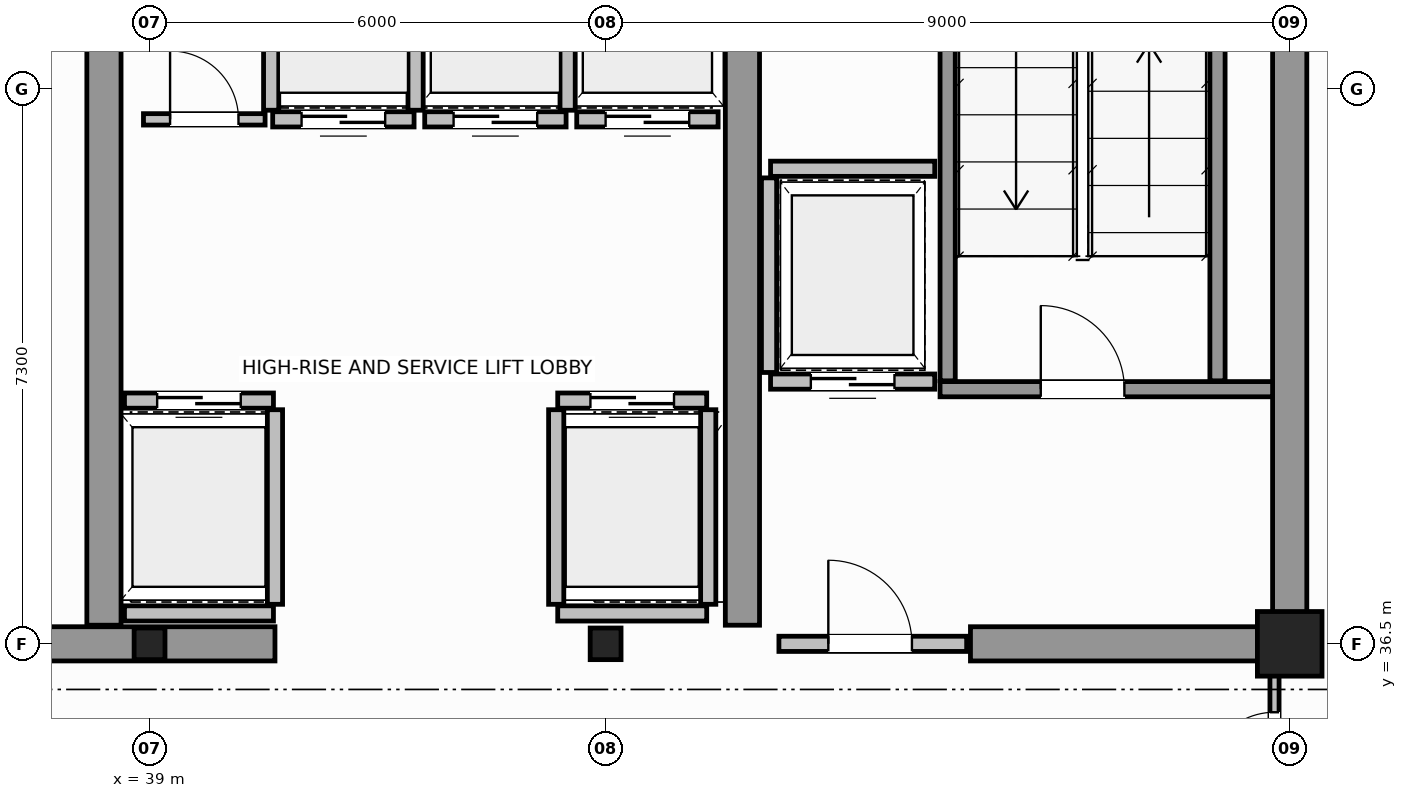
"""IFC4 building model, lengths in metres.
Left out: names, types, materials, properties, quantities, classifications, styles, units other than length and angle.
Written with IfcOpenShell. Run it as: python <this file> out.ifc"""

import sys

from ifc_helpers import new_model, si_unit, direction, frame, frame_2d, origin, origin_2d, place, context, subcontext, project, spatial, rectangle, i_section, extrude, source, transform, mapped, element, fill, save


model = new_model("IFC4")
c1 = context("Model", 3, precision=1e-05, world=origin(), true_north=direction((0.0, 1.0)))
c2 = subcontext(c1, "Body", "Model", "MODEL_VIEW")
j1 = project(units=[si_unit("LENGTHUNIT", "METRE"), si_unit("PLANEANGLEUNIT", "RADIAN")], contexts=[c1])
p1 = place(None, origin())
s1 = spatial("IfcSite", under=j1, at=p1, CompositionType="ELEMENT")
p2 = place(p1, origin())
s2 = spatial("IfcBuilding", under=s1, at=p2, CompositionType="ELEMENT")
p3 = place(p2, frame((0.0, 0.0, 295.4)))
s3 = spatial("IfcBuildingStorey", under=s2, at=p3, CompositionType="ELEMENT", Elevation=295.4)
m1 = source(origin(), c2, "Body", "SweptSolid", [
    extrude(i_section(OverallWidth=0.406, OverallDepth=0.416, WebThickness=0.03, FlangeThickness=0.042, FilletRadius=0.015, at=origin_2d()), origin(), (0.0, 0.0, 1.0), 3.8),
])
for number, where, z_axis, x_axis in (
    (1, (39.0, 36.5, 0.0), (0.0, 0.0, 1.0), (1.0, 0.0, 0.0)),
    (2, (45.0, 36.5, 0.0), (0.0, 0.0, 1.0), (1.0, 0.0, 0.0)),
):
    element("IfcColumn", number, at=place(p3, frame(where, z_axis=z_axis, x_axis=x_axis)), inside=s3, PredefinedType="COLUMN", context=c2, shape_type="MappedRepresentation", body=[
        mapped(m1, transform((0.0, 0.0, 0.0), scale=1.0)),
    ])
m2 = source(origin(), c2, "Body", "SweptSolid", [
    extrude(rectangle(XDim=0.85, YDim=0.85, at=origin_2d()), origin(), (0.0, 0.0, 1.0), 3.8),
])
p4 = place(p3, frame((54.0, 36.5, 0.0), z_axis=(0.0, 0.0, 1.0), x_axis=(1.0, 0.0, 0.0)))
e3 = element("IfcColumn", 3, at=p4, inside=s3, PredefinedType="COLUMN", context=c2, shape_type="MappedRepresentation", body=[
    mapped(m2, transform((0.0, 0.0, 0.0), scale=1.0)),
])
p5 = place(p3, frame((54.0, 36.5, 0.0), z_axis=(0.0, 0.0, 1.0), x_axis=(0.0, 1.0, 0.0)))
e4 = element("IfcWall", 4, at=p5, inside=s3, PredefinedType="SHEAR", context=c2, shape_type="SweptSolid", body=[
    extrude(rectangle(XDim=14.5, YDim=0.45, at=frame_2d((7.25, 0.0))), origin(), (0.0, 0.0, 1.0), 3.8),
])
p6 = place(p3, frame((36.15, 36.5, 0.0), z_axis=(0.0, 0.0, 1.0), x_axis=(1.0, 0.0, 0.0)))
e5 = element("IfcWall", 5, at=p6, inside=s3, PredefinedType="SHEAR", context=c2, shape_type="SweptSolid", body=[
    extrude(rectangle(XDim=4.5, YDim=0.45, at=frame_2d((2.25, 0.0))), origin(), (0.0, 0.0, 1.0), 3.8),
])
p7 = place(p3, frame((49.8, 36.5, 0.0), z_axis=(0.0, 0.0, 1.0), x_axis=(1.0, 0.0, 0.0)))
e6 = element("IfcWall", 6, at=p7, inside=s3, PredefinedType="SHEAR", context=c2, shape_type="SweptSolid", body=[
    extrude(rectangle(XDim=3.955, YDim=0.45, at=frame_2d((1.978, 0.0))), origin(), (0.0, 0.0, 1.0), 2.58),
])
for number, where, z_axis, x_axis in (
    (7, (38.4, 36.745, 0.0), (0.0, 0.0, 1.0), (0.0, 1.0, 0.0)),
    (8, (46.8, 36.745, 0.0), (0.0, 0.0, 1.0), (0.0, 1.0, 0.0)),
):
    element("IfcWall", number, at=place(p3, frame(where, z_axis=z_axis, x_axis=x_axis)), inside=s3, PredefinedType="SHEAR", context=c2, shape_type="SweptSolid", body=[
        extrude(rectangle(XDim=9.455, YDim=0.45, at=frame_2d((4.728, 0.0))), origin(), (0.0, 0.0, 1.0), 3.8),
    ])
p8 = place(p3, frame((49.4, 39.85, 0.0), z_axis=(0.0, 0.0, 1.0), x_axis=(1.0, 0.0, 0.0)))
e9 = element("IfcWall", 9, at=p8, inside=s3, PredefinedType="SOLIDWALL", context=c2, shape_type="SweptSolid", body=[
    extrude(rectangle(XDim=4.375, YDim=0.2, at=frame_2d((2.188, 0.0))), origin(), (0.0, 0.0, 1.0), 3.8),
])
p9 = place(p8, frame((1.325, 0.0, 0.0)))
e10 = element("IfcOpeningElement", 10, at=p9, cuts=e9, PredefinedType="OPENING", context=c2, shape_type="SweptSolid", body=[
    extrude(rectangle(XDim=1.1, YDim=2.15, at=frame_2d((0.55, 1.075))), frame((0.0, 0.11, 0.0), z_axis=(0.0, -1.0, 0.0), x_axis=(1.0, 0.0, 0.0)), (0.0, 0.0, 1.0), 0.22),
])
for number, where, z_axis, x_axis in (
    (11, (49.5, 39.96, 0.0), (0.0, 0.0, 1.0), (0.0, 1.0, 0.0)),
    (12, (53.05, 39.96, 0.0), (0.0, 0.0, 1.0), (0.0, 1.0, 0.0)),
):
    element("IfcWall", number, at=place(p3, frame(where, z_axis=z_axis, x_axis=x_axis)), inside=s3, PredefinedType="SOLIDWALL", context=c2, shape_type="SweptSolid", body=[
        extrude(rectangle(XDim=9.93, YDim=0.2, at=frame_2d((4.965, 0.0))), origin(), (0.0, 0.0, 1.0), 3.8),
    ])
p10 = place(p3, frame((47.28, 36.5, 0.0), z_axis=(0.0, 0.0, 1.0), x_axis=(1.0, 0.0, 0.0)))
e13 = element("IfcWall", 13, at=p10, inside=s3, PredefinedType="SOLIDWALL", context=c2, shape_type="SweptSolid", body=[
    extrude(rectangle(XDim=2.47, YDim=0.2, at=frame_2d((1.235, 0.0))), origin(), (0.0, 0.0, 1.0), 2.57),
])
p11 = place(p10, frame((0.65, 0.0, 0.0)))
e14 = element("IfcOpeningElement", 14, at=p11, cuts=e13, PredefinedType="OPENING", context=c2, shape_type="SweptSolid", body=[
    extrude(rectangle(XDim=1.1, YDim=2.15, at=frame_2d((0.55, 1.075))), frame((0.0, 0.11, 0.0), z_axis=(0.0, -1.0, 0.0), x_axis=(1.0, 0.0, 0.0)), (0.0, 0.0, 1.0), 0.22),
])
p12 = place(p3, frame((38.67, 39.7, 0.0), z_axis=(0.0, 0.0, 1.0), x_axis=(1.0, 0.0, 0.0)))
e15 = element("IfcWall", 15, at=p12, inside=s3, PredefinedType="SOLIDWALL", context=c2, shape_type="SweptSolid", body=[
    extrude(rectangle(XDim=1.96, YDim=0.2, at=frame_2d((0.98, 0.0))), origin(), (0.0, 0.0, 1.0), 3.58),
])
p13 = place(p12, frame((0.43, 0.0, 0.0)))
e16 = element("IfcOpeningElement", 16, at=p13, cuts=e15, PredefinedType="OPENING", context=c2, shape_type="SweptSolid", body=[
    extrude(rectangle(XDim=1.1, YDim=2.15, at=frame_2d((0.55, 1.075))), frame((0.0, 0.11, 0.0), z_axis=(0.0, -1.0, 0.0), x_axis=(1.0, 0.0, 0.0)), (0.0, 0.0, 1.0), 0.22),
])
p14 = place(p3, frame((38.67, 36.9, 0.0), z_axis=(0.0, 0.0, 1.0), x_axis=(1.0, 0.0, 0.0)))
e17 = element("IfcWall", 17, at=p14, inside=s3, PredefinedType="SOLIDWALL", context=c2, shape_type="SweptSolid", body=[
    extrude(rectangle(XDim=1.96, YDim=0.2, at=frame_2d((0.98, 0.0))), origin(), (0.0, 0.0, 1.0), 3.58),
])
p15 = place(p3, frame((40.65, 37.02, 0.0), z_axis=(0.0, 0.0, 1.0), x_axis=(0.0, 1.0, 0.0)))
e18 = element("IfcWall", 18, at=p15, inside=s3, PredefinedType="SOLIDWALL", context=c2, shape_type="SweptSolid", body=[
    extrude(rectangle(XDim=2.56, YDim=0.2, at=frame_2d((1.28, 0.0))), origin(), (0.0, 0.0, 1.0), 3.58),
])
p16 = place(p3, frame((44.37, 39.7, 0.0), z_axis=(0.0, 0.0, 1.0), x_axis=(1.0, 0.0, 0.0)))
e19 = element("IfcWall", 19, at=p16, inside=s3, PredefinedType="SOLIDWALL", context=c2, shape_type="SweptSolid", body=[
    extrude(rectangle(XDim=1.96, YDim=0.2, at=frame_2d((0.98, 0.0))), origin(), (0.0, 0.0, 1.0), 3.58),
])
p17 = place(p16, frame((0.43, 0.0, 0.0)))
e20 = element("IfcOpeningElement", 20, at=p17, cuts=e19, PredefinedType="OPENING", context=c2, shape_type="SweptSolid", body=[
    extrude(rectangle(XDim=1.1, YDim=2.15, at=frame_2d((0.55, 1.075))), frame((0.0, 0.11, 0.0), z_axis=(0.0, -1.0, 0.0), x_axis=(1.0, 0.0, 0.0)), (0.0, 0.0, 1.0), 0.22),
])
p18 = place(p3, frame((44.37, 36.9, 0.0), z_axis=(0.0, 0.0, 1.0), x_axis=(1.0, 0.0, 0.0)))
e21 = element("IfcWall", 21, at=p18, inside=s3, PredefinedType="SOLIDWALL", context=c2, shape_type="SweptSolid", body=[
    extrude(rectangle(XDim=1.96, YDim=0.2, at=frame_2d((0.98, 0.0))), origin(), (0.0, 0.0, 1.0), 2.57),
])
for number, where, z_axis, x_axis in (
    (22, (44.35, 37.02, 0.0), (0.0, 0.0, 1.0), (0.0, 1.0, 0.0)),
    (23, (46.35, 37.02, 0.0), (0.0, 0.0, 1.0), (0.0, 1.0, 0.0)),
):
    element("IfcWall", number, at=place(p3, frame(where, z_axis=z_axis, x_axis=x_axis)), inside=s3, PredefinedType="SOLIDWALL", context=c2, shape_type="SweptSolid", body=[
        extrude(rectangle(XDim=2.56, YDim=0.2, at=frame_2d((1.28, 0.0))), origin(), (0.0, 0.0, 1.0), 3.58),
    ])
p19 = place(p3, frame((40.62, 43.4, 0.0), z_axis=(0.0, 0.0, 1.0), x_axis=(1.0, 0.0, 0.0)))
e24 = element("IfcWall", 24, at=p19, inside=s3, PredefinedType="SOLIDWALL", context=c2, shape_type="SweptSolid", body=[
    extrude(rectangle(XDim=1.86, YDim=0.2, at=frame_2d((0.93, 0.0))), origin(), (0.0, 0.0, 1.0), 3.58),
])
p20 = place(p19, frame((0.38, 0.0, 0.0)))
e25 = element("IfcOpeningElement", 25, at=p20, cuts=e24, PredefinedType="OPENING", context=c2, shape_type="SweptSolid", body=[
    extrude(rectangle(XDim=1.1, YDim=2.15, at=frame_2d((0.55, 1.075))), frame((0.0, 0.11, 0.0), z_axis=(0.0, -1.0, 0.0), x_axis=(1.0, 0.0, 0.0)), (0.0, 0.0, 1.0), 0.22),
])
for number, where, z_axis, x_axis in (
    (26, (40.6, 43.52, 0.0), (0.0, 0.0, 1.0), (0.0, 1.0, 0.0)),
    (27, (42.5, 43.52, 0.0), (0.0, 0.0, 1.0), (0.0, 1.0, 0.0)),
):
    element("IfcWall", number, at=place(p3, frame(where, z_axis=z_axis, x_axis=x_axis)), inside=s3, PredefinedType="SOLIDWALL", context=c2, shape_type="SweptSolid", body=[
        extrude(rectangle(XDim=2.56, YDim=0.2, at=frame_2d((1.28, 0.0))), origin(), (0.0, 0.0, 1.0), 3.58),
    ])
p21 = place(p3, frame((42.62, 43.4, 0.0), z_axis=(0.0, 0.0, 1.0), x_axis=(1.0, 0.0, 0.0)))
e28 = element("IfcWall", 28, at=p21, inside=s3, PredefinedType="SOLIDWALL", context=c2, shape_type="SweptSolid", body=[
    extrude(rectangle(XDim=1.86, YDim=0.2, at=frame_2d((0.93, 0.0))), origin(), (0.0, 0.0, 1.0), 3.58),
])
p22 = place(p21, frame((0.38, 0.0, 0.0)))
e29 = element("IfcOpeningElement", 29, at=p22, cuts=e28, PredefinedType="OPENING", context=c2, shape_type="SweptSolid", body=[
    extrude(rectangle(XDim=1.1, YDim=2.15, at=frame_2d((0.55, 1.075))), frame((0.0, 0.11, 0.0), z_axis=(0.0, -1.0, 0.0), x_axis=(1.0, 0.0, 0.0)), (0.0, 0.0, 1.0), 0.22),
])
p23 = place(p3, frame((44.5, 43.52, 0.0), z_axis=(0.0, 0.0, 1.0), x_axis=(0.0, 1.0, 0.0)))
e30 = element("IfcWall", 30, at=p23, inside=s3, PredefinedType="SOLIDWALL", context=c2, shape_type="SweptSolid", body=[
    extrude(rectangle(XDim=2.56, YDim=0.2, at=frame_2d((1.28, 0.0))), origin(), (0.0, 0.0, 1.0), 3.58),
])
p24 = place(p3, frame((44.62, 43.4, 0.0), z_axis=(0.0, 0.0, 1.0), x_axis=(1.0, 0.0, 0.0)))
e31 = element("IfcWall", 31, at=p24, inside=s3, PredefinedType="SOLIDWALL", context=c2, shape_type="SweptSolid", body=[
    extrude(rectangle(XDim=1.86, YDim=0.2, at=frame_2d((0.93, 0.0))), origin(), (0.0, 0.0, 1.0), 3.58),
])
p25 = place(p24, frame((0.38, 0.0, 0.0)))
e32 = element("IfcOpeningElement", 32, at=p25, cuts=e31, PredefinedType="OPENING", context=c2, shape_type="SweptSolid", body=[
    extrude(rectangle(XDim=1.1, YDim=2.15, at=frame_2d((0.55, 1.075))), frame((0.0, 0.11, 0.0), z_axis=(0.0, -1.0, 0.0), x_axis=(1.0, 0.0, 0.0)), (0.0, 0.0, 1.0), 0.22),
])
p26 = place(p3, frame((47.17, 39.95, 0.0), z_axis=(0.0, 0.0, 1.0), x_axis=(1.0, 0.0, 0.0)))
e33 = element("IfcWall", 33, at=p26, inside=s3, PredefinedType="SOLIDWALL", context=c2, shape_type="SweptSolid", body=[
    extrude(rectangle(XDim=2.16, YDim=0.2, at=frame_2d((1.08, 0.0))), origin(), (0.0, 0.0, 1.0), 3.58),
])
p27 = place(p26, frame((0.53, 0.0, 0.0)))
e34 = element("IfcOpeningElement", 34, at=p27, cuts=e33, PredefinedType="OPENING", context=c2, shape_type="SweptSolid", body=[
    extrude(rectangle(XDim=1.1, YDim=2.15, at=frame_2d((0.55, 1.075))), frame((0.0, 0.11, 0.0), z_axis=(0.0, -1.0, 0.0), x_axis=(1.0, 0.0, 0.0)), (0.0, 0.0, 1.0), 0.22),
])
p28 = place(p3, frame((47.17, 42.75, 0.0), z_axis=(0.0, 0.0, 1.0), x_axis=(1.0, 0.0, 0.0)))
e35 = element("IfcWall", 35, at=p28, inside=s3, PredefinedType="SOLIDWALL", context=c2, shape_type="SweptSolid", body=[
    extrude(rectangle(XDim=2.16, YDim=0.2, at=frame_2d((1.08, 0.0))), origin(), (0.0, 0.0, 1.0), 3.58),
])
p29 = place(p3, frame((47.15, 40.07, 0.0), z_axis=(0.0, 0.0, 1.0), x_axis=(0.0, 1.0, 0.0)))
e36 = element("IfcWall", 36, at=p29, inside=s3, PredefinedType="SOLIDWALL", context=c2, shape_type="SweptSolid", body=[
    extrude(rectangle(XDim=2.56, YDim=0.2, at=frame_2d((1.28, 0.0))), origin(), (0.0, 0.0, 1.0), 3.58),
])
p30 = place(p3, frame((38.92, 43.4, 0.0), z_axis=(0.0, 0.0, 1.0), x_axis=(1.0, 0.0, 0.0)))
e37 = element("IfcWall", 37, at=p30, inside=s3, PredefinedType="PARTITIONING", context=c2, shape_type="SweptSolid", body=[
    extrude(rectangle(XDim=1.6, YDim=0.15, at=frame_2d((0.8, 0.0))), origin(), (0.0, 0.0, 1.0), 3.58),
])
p31 = place(p30, frame((0.35, 0.0, 0.0)))
e38 = element("IfcOpeningElement", 38, at=p31, cuts=e37, PredefinedType="OPENING", context=c2, shape_type="SweptSolid", body=[
    extrude(rectangle(XDim=0.9, YDim=2.1, at=frame_2d((0.45, 1.05))), frame((0.0, 0.085, 0.0), z_axis=(0.0, -1.0, 0.0), x_axis=(1.0, 0.0, 0.0)), (0.0, 0.0, 1.0), 0.17),
])
p32 = place(p3, frame((53.8, 34.0, 0.0), z_axis=(0.0, 0.0, 1.0), x_axis=(0.0, 1.0, 0.0)))
e39 = element("IfcWall", 39, at=p32, inside=s3, PredefinedType="PARTITIONING", context=c2, shape_type="SweptSolid", body=[
    extrude(rectangle(XDim=2.44, YDim=0.12, at=frame_2d((1.22, 0.0))), origin(), (0.0, 0.0, 1.0), 3.58),
])
p33 = place(p32, frame((0.7, 0.0, 0.0)))
e40 = element("IfcOpeningElement", 40, at=p33, cuts=e39, PredefinedType="OPENING", context=c2, shape_type="SweptSolid", body=[
    extrude(rectangle(XDim=0.9, YDim=2.15, at=frame_2d((0.45, 1.075))), frame((0.0, 0.07, 0.0), z_axis=(0.0, -1.0, 0.0), x_axis=(1.0, 0.0, 0.0)), (0.0, 0.0, 1.0), 0.14),
])
m3 = source(origin(), c2, "Body", "SweptSolid", [
    extrude(rectangle(XDim=1.1, YDim=2.15, at=frame_2d((0.55, 1.075))), frame((0.0, 0.025, 0.0), z_axis=(0.0, -1.0, 0.0), x_axis=(1.0, 0.0, 0.0)), (0.0, 0.0, 1.0), 0.05),
])
p34 = place(p9, origin())
e41 = element("IfcDoor", 41, at=p34, inside=s3, OperationType="SINGLE_SWING_RIGHT", PredefinedType="DOOR", context=c2, shape_type="MappedRepresentation", body=[
    mapped(m3, transform((0.0, 0.0, 0.0), scale=1.0)),
])
fill(e10, e41)
p35 = place(p11, origin())
e42 = element("IfcDoor", 42, at=p35, inside=s3, OperationType="SINGLE_SWING_LEFT", PredefinedType="DOOR", context=c2, shape_type="MappedRepresentation", body=[
    mapped(m3, transform((0.0, 0.0, 0.0), scale=1.0)),
])
fill(e14, e42)
p36 = place(p13, origin())
e43 = element("IfcDoor", 43, at=p36, inside=s3, OperationType="DOUBLE_DOOR_SLIDING", PredefinedType="DOOR", context=c2, shape_type="MappedRepresentation", body=[
    mapped(m3, transform((0.0, 0.0, 0.0), scale=1.0)),
])
fill(e16, e43)
p37 = place(p17, origin())
e44 = element("IfcDoor", 44, at=p37, inside=s3, OperationType="DOUBLE_DOOR_SLIDING", PredefinedType="DOOR", context=c2, shape_type="MappedRepresentation", body=[
    mapped(m3, transform((0.0, 0.0, 0.0), scale=1.0)),
])
fill(e20, e44)
p38 = place(p20, origin())
e45 = element("IfcDoor", 45, at=p38, inside=s3, OperationType="DOUBLE_DOOR_SLIDING", PredefinedType="DOOR", context=c2, shape_type="MappedRepresentation", body=[
    mapped(m3, transform((0.0, 0.0, 0.0), scale=1.0)),
])
fill(e25, e45)
p39 = place(p22, origin())
e46 = element("IfcDoor", 46, at=p39, inside=s3, OperationType="DOUBLE_DOOR_SLIDING", PredefinedType="DOOR", context=c2, shape_type="MappedRepresentation", body=[
    mapped(m3, transform((0.0, 0.0, 0.0), scale=1.0)),
])
fill(e29, e46)
p40 = place(p25, origin())
e47 = element("IfcDoor", 47, at=p40, inside=s3, OperationType="DOUBLE_DOOR_SLIDING", PredefinedType="DOOR", context=c2, shape_type="MappedRepresentation", body=[
    mapped(m3, transform((0.0, 0.0, 0.0), scale=1.0)),
])
fill(e32, e47)
p41 = place(p27, origin())
e48 = element("IfcDoor", 48, at=p41, inside=s3, OperationType="DOUBLE_DOOR_SLIDING", PredefinedType="DOOR", context=c2, shape_type="MappedRepresentation", body=[
    mapped(m3, transform((0.0, 0.0, 0.0), scale=1.0)),
])
fill(e34, e48)
m4 = source(origin(), c2, "Body", "SweptSolid", [
    extrude(rectangle(XDim=0.9, YDim=2.1, at=frame_2d((0.45, 1.05))), frame((0.0, 0.025, 0.0), z_axis=(0.0, -1.0, 0.0), x_axis=(1.0, 0.0, 0.0)), (0.0, 0.0, 1.0), 0.05),
])
p42 = place(p31, origin())
e49 = element("IfcDoor", 49, at=p42, inside=s3, OperationType="SINGLE_SWING_LEFT", PredefinedType="DOOR", context=c2, shape_type="MappedRepresentation", body=[
    mapped(m4, transform((0.0, 0.0, 0.0), scale=1.0)),
])
fill(e38, e49)
m5 = source(origin(), c2, "Body", "SweptSolid", [
    extrude(rectangle(XDim=0.9, YDim=2.15, at=frame_2d((0.45, 1.075))), frame((0.0, 0.025, 0.0), z_axis=(0.0, -1.0, 0.0), x_axis=(1.0, 0.0, 0.0)), (0.0, 0.0, 1.0), 0.05),
])
p43 = place(p33, origin())
e50 = element("IfcDoor", 50, at=p43, inside=s3, OperationType="SINGLE_SWING_RIGHT", PredefinedType="DOOR", context=c2, shape_type="MappedRepresentation", body=[
    mapped(m5, transform((0.0, 0.0, 0.0), scale=1.0)),
])
fill(e40, e50)
save(model, sys.argv[1])
